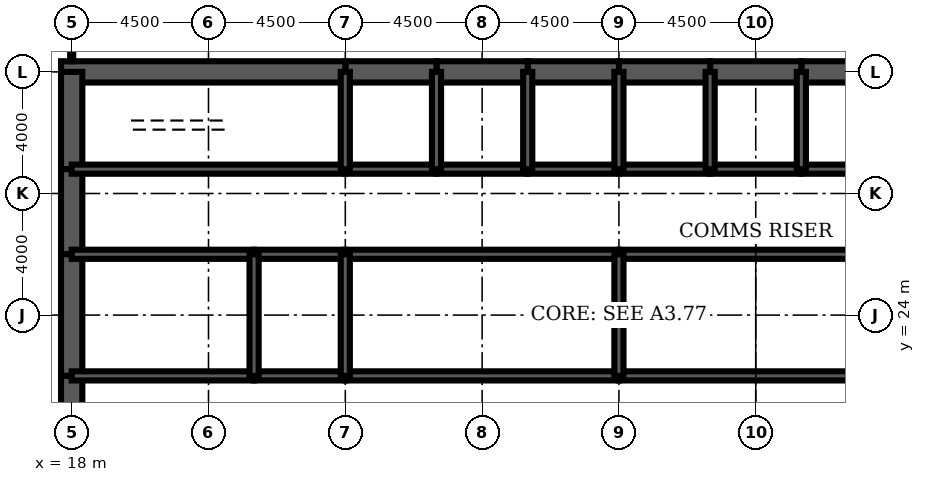
"""IFC4 building model, lengths in metres.
Left out: names, types, materials, properties, quantities, classifications, styles, units other than length and angle.
Written with IfcOpenShell. Run it as: python <this file> out.ifc"""

import sys

from ifc_helpers import new_model, si_unit, direction, frame, frame_2d, origin, place, context, subcontext, project, spatial, rectangle, extrude, element, fill, save


model = new_model("IFC4")
c1 = context("Model", 3, precision=1e-05, world=origin(), true_north=direction((0.0, 1.0)))
c2 = subcontext(c1, "Body", "Model", "MODEL_VIEW")
j1 = project(units=[si_unit("LENGTHUNIT", "METRE"), si_unit("PLANEANGLEUNIT", "RADIAN")], contexts=[c1])
p1 = place(None, origin())
s1 = spatial("IfcSite", under=j1, at=p1, CompositionType="ELEMENT")
p2 = place(p1, origin())
s2 = spatial("IfcBuilding", under=s1, at=p2, CompositionType="ELEMENT")
p3 = place(p2, frame((0.0, 0.0, 329.9)))
s3 = spatial("IfcBuildingStorey", under=s2, at=p3, CompositionType="ELEMENT", Elevation=329.9)
for number, where, z_axis, x_axis in (
    (1, (45.0, 32.0, 0.0), (0.0, 0.0, 1.0), (-1.0, 0.0, 0.0)),
    (2, (42.0, 32.0, 0.0), (0.0, 0.0, 1.0), (-1.0, 0.0, 0.0)),
    (3, (39.0, 32.0, 0.0), (0.0, 0.0, 1.0), (-1.0, 0.0, 0.0)),
    (4, (36.0, 32.0, 0.0), (0.0, 0.0, 1.0), (-1.0, 0.0, 0.0)),
    (5, (33.0, 32.0, 0.0), (0.0, 0.0, 1.0), (-1.0, 0.0, 0.0)),
    (6, (30.0, 32.0, 0.0), (0.0, 0.0, 1.0), (-1.0, 0.0, 0.0)),
):
    element("IfcWall", number, at=place(p3, frame(where, z_axis=z_axis, x_axis=x_axis)), inside=s3, PredefinedType="SHEAR", context=c2, shape_type="SweptSolid", body=[
        extrude(rectangle(XDim=3.0, YDim=0.7, at=frame_2d((1.5, 0.0))), origin(), (0.0, 0.0, 1.0), 4.2),
    ])
p4 = place(p3, frame((27.0, 32.0, 0.0), z_axis=(0.0, 0.0, 1.0), x_axis=(-1.0, 0.0, 0.0)))
e7 = element("IfcWall", 7, at=p4, inside=s3, PredefinedType="SHEAR", context=c2, shape_type="SweptSolid", body=[
    extrude(rectangle(XDim=9.35, YDim=0.7, at=frame_2d((4.675, 0.0))), origin(), (0.0, 0.0, 1.0), 4.2),
])
p5 = place(p3, frame((18.0, 32.0, 0.0), z_axis=(0.0, 0.0, 1.0), x_axis=(0.0, -1.0, 0.0)))
e8 = element("IfcWall", 8, at=p5, inside=s3, PredefinedType="SHEAR", context=c2, shape_type="SweptSolid", body=[
    extrude(rectangle(XDim=3.2, YDim=0.7, at=frame_2d((1.6, 0.0))), origin(), (0.0, 0.0, 1.0), 4.2),
])
p6 = place(p3, frame((18.0, 28.8, 0.0), z_axis=(0.0, 0.0, 1.0), x_axis=(0.0, -1.0, 0.0)))
e9 = element("IfcWall", 9, at=p6, inside=s3, PredefinedType="SHEAR", context=c2, shape_type="SweptSolid", body=[
    extrude(rectangle(XDim=2.8, YDim=0.7, at=frame_2d((1.4, 0.0))), origin(), (0.0, 0.0, 1.0), 4.2),
])
p7 = place(p6, frame((0.4, 0.0, 0.0)))
e10 = element("IfcOpeningElement", 10, at=p7, cuts=e9, PredefinedType="OPENING", context=c2, shape_type="SweptSolid", body=[
    extrude(rectangle(XDim=1.8, YDim=2.1, at=frame_2d((0.9, 1.05))), frame((0.0, 0.36, 0.0), z_axis=(0.0, -1.0, 0.0), x_axis=(1.0, 0.0, 0.0)), (0.0, 0.0, 1.0), 0.72),
])
p8 = place(p3, frame((18.0, 26.0, 0.0), z_axis=(0.0, 0.0, 1.0), x_axis=(0.0, -1.0, 0.0)))
e11 = element("IfcWall", 11, at=p8, inside=s3, PredefinedType="SHEAR", context=c2, shape_type="SweptSolid", body=[
    extrude(rectangle(XDim=4.0, YDim=0.7, at=frame_2d((2.0, 0.0))), origin(), (0.0, 0.0, 1.0), 4.2),
])
p9 = place(p3, frame((18.0, 22.0, 0.0), z_axis=(0.0, 0.0, 1.0), x_axis=(0.0, -1.0, 0.0)))
e12 = element("IfcWall", 12, at=p9, inside=s3, PredefinedType="SHEAR", context=c2, shape_type="SweptSolid", body=[
    extrude(rectangle(XDim=2.8, YDim=0.7, at=frame_2d((1.4, 0.0))), origin(), (0.0, 0.0, 1.0), 4.2),
])
p10 = place(p9, frame((0.6, 0.0, 0.0)))
e13 = element("IfcOpeningElement", 13, at=p10, cuts=e12, PredefinedType="OPENING", context=c2, shape_type="SweptSolid", body=[
    extrude(rectangle(XDim=1.8, YDim=2.1, at=frame_2d((0.9, 1.05))), frame((0.0, 0.36, 0.0), z_axis=(0.0, -1.0, 0.0), x_axis=(1.0, 0.0, 0.0)), (0.0, 0.0, 1.0), 0.72),
])
p11 = place(p3, frame((18.0, 28.8, 0.0), z_axis=(0.0, 0.0, 1.0), x_axis=(1.0, 0.0, 0.0)))
e14 = element("IfcWall", 14, at=p11, inside=s3, PredefinedType="SOLIDWALL", context=c2, shape_type="SweptSolid", body=[
    extrude(rectangle(XDim=9.0, YDim=0.3, at=frame_2d((4.5, 0.0))), origin(), (0.0, 0.0, 1.0), 4.2),
])
p12 = place(p11, frame((0.65, 0.0, 0.0)))
e15 = element("IfcOpeningElement", 15, at=p12, cuts=e14, PredefinedType="OPENING", context=c2, shape_type="SweptSolid", body=[
    extrude(rectangle(XDim=1.0, YDim=2.1, at=frame_2d((0.5, 1.05))), frame((0.0, 0.16, 0.0), z_axis=(0.0, -1.0, 0.0), x_axis=(1.0, 0.0, 0.0)), (0.0, 0.0, 1.0), 0.32),
])
p13 = place(p3, frame((27.0, 28.8, 0.0), z_axis=(0.0, 0.0, 1.0), x_axis=(1.0, 0.0, 0.0)))
e16 = element("IfcWall", 16, at=p13, inside=s3, PredefinedType="SOLIDWALL", context=c2, shape_type="SweptSolid", body=[
    extrude(rectangle(XDim=3.0, YDim=0.3, at=frame_2d((1.5, 0.0))), origin(), (0.0, 0.0, 1.0), 4.2),
])
p14 = place(p13, frame((0.95, 0.0, 0.0)))
e17 = element("IfcOpeningElement", 17, at=p14, cuts=e16, PredefinedType="OPENING", context=c2, shape_type="SweptSolid", body=[
    extrude(rectangle(XDim=1.1, YDim=2.2, at=frame_2d((0.55, 1.1))), frame((0.0, 0.16, 0.0), z_axis=(0.0, -1.0, 0.0), x_axis=(1.0, 0.0, 0.0)), (0.0, 0.0, 1.0), 0.32),
])
p15 = place(p3, frame((30.0, 28.8, 0.0), z_axis=(0.0, 0.0, 1.0), x_axis=(1.0, 0.0, 0.0)))
e18 = element("IfcWall", 18, at=p15, inside=s3, PredefinedType="SOLIDWALL", context=c2, shape_type="SweptSolid", body=[
    extrude(rectangle(XDim=3.0, YDim=0.3, at=frame_2d((1.5, 0.0))), origin(), (0.0, 0.0, 1.0), 4.2),
])
p16 = place(p15, frame((0.95, 0.0, 0.0)))
e19 = element("IfcOpeningElement", 19, at=p16, cuts=e18, PredefinedType="OPENING", context=c2, shape_type="SweptSolid", body=[
    extrude(rectangle(XDim=1.1, YDim=2.2, at=frame_2d((0.55, 1.1))), frame((0.0, 0.16, 0.0), z_axis=(0.0, -1.0, 0.0), x_axis=(1.0, 0.0, 0.0)), (0.0, 0.0, 1.0), 0.32),
])
p17 = place(p3, frame((33.0, 28.8, 0.0), z_axis=(0.0, 0.0, 1.0), x_axis=(1.0, 0.0, 0.0)))
e20 = element("IfcWall", 20, at=p17, inside=s3, PredefinedType="SOLIDWALL", context=c2, shape_type="SweptSolid", body=[
    extrude(rectangle(XDim=3.0, YDim=0.3, at=frame_2d((1.5, 0.0))), origin(), (0.0, 0.0, 1.0), 4.2),
])
p18 = place(p17, frame((0.95, 0.0, 0.0)))
e21 = element("IfcOpeningElement", 21, at=p18, cuts=e20, PredefinedType="OPENING", context=c2, shape_type="SweptSolid", body=[
    extrude(rectangle(XDim=1.1, YDim=2.2, at=frame_2d((0.55, 1.1))), frame((0.0, 0.16, 0.0), z_axis=(0.0, -1.0, 0.0), x_axis=(1.0, 0.0, 0.0)), (0.0, 0.0, 1.0), 0.32),
])
p19 = place(p3, frame((36.0, 28.8, 0.0), z_axis=(0.0, 0.0, 1.0), x_axis=(1.0, 0.0, 0.0)))
e22 = element("IfcWall", 22, at=p19, inside=s3, PredefinedType="SOLIDWALL", context=c2, shape_type="SweptSolid", body=[
    extrude(rectangle(XDim=3.0, YDim=0.3, at=frame_2d((1.5, 0.0))), origin(), (0.0, 0.0, 1.0), 4.2),
])
p20 = place(p19, frame((1.0, 0.0, 0.0)))
e23 = element("IfcOpeningElement", 23, at=p20, cuts=e22, PredefinedType="OPENING", context=c2, shape_type="SweptSolid", body=[
    extrude(rectangle(XDim=1.0, YDim=2.1, at=frame_2d((0.5, 1.05))), frame((0.0, 0.16, 0.0), z_axis=(0.0, -1.0, 0.0), x_axis=(1.0, 0.0, 0.0)), (0.0, 0.0, 1.0), 0.32),
])
p21 = place(p3, frame((39.0, 28.8, 0.0), z_axis=(0.0, 0.0, 1.0), x_axis=(1.0, 0.0, 0.0)))
e24 = element("IfcWall", 24, at=p21, inside=s3, PredefinedType="SOLIDWALL", context=c2, shape_type="SweptSolid", body=[
    extrude(rectangle(XDim=3.0, YDim=0.3, at=frame_2d((1.5, 0.0))), origin(), (0.0, 0.0, 1.0), 4.2),
])
p22 = place(p21, frame((1.0, 0.0, 0.0)))
e25 = element("IfcOpeningElement", 25, at=p22, cuts=e24, PredefinedType="OPENING", context=c2, shape_type="SweptSolid", body=[
    extrude(rectangle(XDim=1.0, YDim=2.1, at=frame_2d((0.5, 1.05))), frame((0.0, 0.16, 0.0), z_axis=(0.0, -1.0, 0.0), x_axis=(1.0, 0.0, 0.0)), (0.0, 0.0, 1.0), 0.32),
])
p23 = place(p3, frame((42.0, 28.8, 0.0), z_axis=(0.0, 0.0, 1.0), x_axis=(1.0, 0.0, 0.0)))
e26 = element("IfcWall", 26, at=p23, inside=s3, PredefinedType="SOLIDWALL", context=c2, shape_type="SweptSolid", body=[
    extrude(rectangle(XDim=3.0, YDim=0.3, at=frame_2d((1.5, 0.0))), origin(), (0.0, 0.0, 1.0), 4.2),
])
p24 = place(p23, frame((0.95, 0.0, 0.0)))
e27 = element("IfcOpeningElement", 27, at=p24, cuts=e26, PredefinedType="OPENING", context=c2, shape_type="SweptSolid", body=[
    extrude(rectangle(XDim=1.1, YDim=2.2, at=frame_2d((0.55, 1.1))), frame((0.0, 0.16, 0.0), z_axis=(0.0, -1.0, 0.0), x_axis=(1.0, 0.0, 0.0)), (0.0, 0.0, 1.0), 0.32),
])
p25 = place(p3, frame((18.0, 22.0, 0.0), z_axis=(0.0, 0.0, 1.0), x_axis=(1.0, 0.0, 0.0)))
e28 = element("IfcWall", 28, at=p25, inside=s3, PredefinedType="SOLIDWALL", context=c2, shape_type="SweptSolid", body=[
    extrude(rectangle(XDim=6.0, YDim=0.3, at=frame_2d((3.0, 0.0))), origin(), (0.0, 0.0, 1.0), 4.2),
])
p26 = place(p25, frame((4.4, 0.0, 0.0)))
e29 = element("IfcOpeningElement", 29, at=p26, cuts=e28, PredefinedType="OPENING", context=c2, shape_type="SweptSolid", body=[
    extrude(rectangle(XDim=1.0, YDim=2.1, at=frame_2d((0.5, 1.05))), frame((0.0, 0.16, 0.0), z_axis=(0.0, -1.0, 0.0), x_axis=(1.0, 0.0, 0.0)), (0.0, 0.0, 1.0), 0.32),
])
p27 = place(p25, frame((0.9, 0.0, 0.0)))
e30 = element("IfcOpeningElement", 30, at=p27, cuts=e28, PredefinedType="OPENING", context=c2, shape_type="SweptSolid", body=[
    extrude(rectangle(XDim=1.0, YDim=2.1, at=frame_2d((0.5, 1.05))), frame((0.0, 0.16, 0.0), z_axis=(0.0, -1.0, 0.0), x_axis=(1.0, 0.0, 0.0)), (0.0, 0.0, 1.0), 0.32),
])
p28 = place(p3, frame((24.0, 22.0, 0.0), z_axis=(0.0, 0.0, 1.0), x_axis=(1.0, 0.0, 0.0)))
e31 = element("IfcWall", 31, at=p28, inside=s3, PredefinedType="SOLIDWALL", context=c2, shape_type="SweptSolid", body=[
    extrude(rectangle(XDim=3.0, YDim=0.3, at=frame_2d((1.5, 0.0))), origin(), (0.0, 0.0, 1.0), 4.2),
])
p29 = place(p28, frame((1.0, 0.0, 0.0)))
e32 = element("IfcOpeningElement", 32, at=p29, cuts=e31, PredefinedType="OPENING", context=c2, shape_type="SweptSolid", body=[
    extrude(rectangle(XDim=1.0, YDim=2.1, at=frame_2d((0.5, 1.05))), frame((0.0, 0.16, 0.0), z_axis=(0.0, -1.0, 0.0), x_axis=(1.0, 0.0, 0.0)), (0.0, 0.0, 1.0), 0.32),
])
p30 = place(p3, frame((27.0, 22.0, 0.0), z_axis=(0.0, 0.0, 1.0), x_axis=(1.0, 0.0, 0.0)))
e33 = element("IfcWall", 33, at=p30, inside=s3, PredefinedType="SOLIDWALL", context=c2, shape_type="SweptSolid", body=[
    extrude(rectangle(XDim=9.0, YDim=0.3, at=frame_2d((4.5, 0.0))), origin(), (0.0, 0.0, 1.0), 4.2),
])
p31 = place(p30, frame((4.0, 0.0, 0.0)))
e34 = element("IfcOpeningElement", 34, at=p31, cuts=e33, PredefinedType="OPENING", context=c2, shape_type="SweptSolid", body=[
    extrude(rectangle(XDim=1.0, YDim=2.1, at=frame_2d((0.5, 1.05))), frame((0.0, 0.16, 0.0), z_axis=(0.0, -1.0, 0.0), x_axis=(1.0, 0.0, 0.0)), (0.0, 0.0, 1.0), 0.32),
])
p32 = place(p3, frame((36.0, 22.0, 0.0), z_axis=(0.0, 0.0, 1.0), x_axis=(1.0, 0.0, 0.0)))
e35 = element("IfcWall", 35, at=p32, inside=s3, PredefinedType="SOLIDWALL", context=c2, shape_type="SweptSolid", body=[
    extrude(rectangle(XDim=9.0, YDim=0.3, at=frame_2d((4.5, 0.0))), origin(), (0.0, 0.0, 1.0), 4.2),
])
p33 = place(p32, frame((4.0, 0.0, 0.0)))
e36 = element("IfcOpeningElement", 36, at=p33, cuts=e35, PredefinedType="OPENING", context=c2, shape_type="SweptSolid", body=[
    extrude(rectangle(XDim=1.0, YDim=2.1, at=frame_2d((0.5, 1.05))), frame((0.0, 0.16, 0.0), z_axis=(0.0, -1.0, 0.0), x_axis=(1.0, 0.0, 0.0)), (0.0, 0.0, 1.0), 0.32),
])
p34 = place(p3, frame((18.0, 26.0, 0.0), z_axis=(0.0, 0.0, 1.0), x_axis=(1.0, 0.0, 0.0)))
e37 = element("IfcWall", 37, at=p34, inside=s3, PredefinedType="SOLIDWALL", context=c2, shape_type="SweptSolid", body=[
    extrude(rectangle(XDim=6.0, YDim=0.3, at=frame_2d((3.0, 0.0))), origin(), (0.0, 0.0, 1.0), 4.2),
])
p35 = place(p3, frame((24.0, 26.0, 0.0), z_axis=(0.0, 0.0, 1.0), x_axis=(1.0, 0.0, 0.0)))
e38 = element("IfcWall", 38, at=p35, inside=s3, PredefinedType="SOLIDWALL", context=c2, shape_type="SweptSolid", body=[
    extrude(rectangle(XDim=3.0, YDim=0.3, at=frame_2d((1.5, 0.0))), origin(), (0.0, 0.0, 1.0), 4.2),
])
for number, where, z_axis, x_axis in (
    (39, (27.0, 26.0, 0.0), (0.0, 0.0, 1.0), (1.0, 0.0, 0.0)),
    (40, (36.0, 26.0, 0.0), (0.0, 0.0, 1.0), (1.0, 0.0, 0.0)),
):
    element("IfcWall", number, at=place(p3, frame(where, z_axis=z_axis, x_axis=x_axis)), inside=s3, PredefinedType="SOLIDWALL", context=c2, shape_type="SweptSolid", body=[
        extrude(rectangle(XDim=9.0, YDim=0.3, at=frame_2d((4.5, 0.0))), origin(), (0.0, 0.0, 1.0), 4.2),
    ])
for number, where, z_axis, x_axis in (
    (41, (27.0, 28.8, 0.0), (0.0, 0.0, 1.0), (0.0, 1.0, 0.0)),
    (42, (30.0, 28.8, 0.0), (0.0, 0.0, 1.0), (0.0, 1.0, 0.0)),
    (43, (33.0, 28.8, 0.0), (0.0, 0.0, 1.0), (0.0, 1.0, 0.0)),
    (44, (36.0, 28.8, 0.0), (0.0, 0.0, 1.0), (0.0, 1.0, 0.0)),
    (45, (39.0, 28.8, 0.0), (0.0, 0.0, 1.0), (0.0, 1.0, 0.0)),
    (46, (42.0, 28.8, 0.0), (0.0, 0.0, 1.0), (0.0, 1.0, 0.0)),
):
    element("IfcWall", number, at=place(p3, frame(where, z_axis=z_axis, x_axis=x_axis)), inside=s3, PredefinedType="SOLIDWALL", context=c2, shape_type="SweptSolid", body=[
        extrude(rectangle(XDim=3.2, YDim=0.3, at=frame_2d((1.6, 0.0))), origin(), (0.0, 0.0, 1.0), 4.2),
    ])
for number, where, z_axis, x_axis in (
    (47, (24.0, 22.0, 0.0), (0.0, 0.0, 1.0), (0.0, 1.0, 0.0)),
    (48, (27.0, 22.0, 0.0), (0.0, 0.0, 1.0), (0.0, 1.0, 0.0)),
    (49, (36.0, 22.0, 0.0), (0.0, 0.0, 1.0), (0.0, 1.0, 0.0)),
):
    element("IfcWall", number, at=place(p3, frame(where, z_axis=z_axis, x_axis=x_axis)), inside=s3, PredefinedType="SOLIDWALL", context=c2, shape_type="SweptSolid", body=[
        extrude(rectangle(XDim=4.0, YDim=0.3, at=frame_2d((2.0, 0.0))), origin(), (0.0, 0.0, 1.0), 4.2),
    ])
p36 = place(p3, frame((42.5, 22.15, 0.0), z_axis=(0.0, 0.0, 1.0), x_axis=(0.0, 1.0, 0.0)))
e50 = element("IfcWall", 50, at=p36, inside=s3, PredefinedType="PARTITIONING", context=c2, shape_type="SweptSolid", body=[
    extrude(rectangle(XDim=3.7, YDim=0.15, at=frame_2d((1.85, 0.0))), origin(), (0.0, 0.0, 1.0), 3.0),
])
p37 = place(p36, frame((2.2, 0.0, 0.0)))
e51 = element("IfcOpeningElement", 51, at=p37, cuts=e50, PredefinedType="OPENING", context=c2, shape_type="SweptSolid", body=[
    extrude(rectangle(XDim=1.0, YDim=2.1, at=frame_2d((0.5, 1.05))), frame((0.0, 0.085, 0.0), z_axis=(0.0, -1.0, 0.0), x_axis=(1.0, 0.0, 0.0)), (0.0, 0.0, 1.0), 0.17),
])
p38 = place(p3, frame((20.525, 22.15, 0.0), z_axis=(0.0, 0.0, 1.0), x_axis=(0.0, 1.0, 0.0)))
e52 = element("IfcWall", 52, at=p38, inside=s3, PredefinedType="PARTITIONING", context=c2, shape_type="SweptSolid", body=[
    extrude(rectangle(XDim=3.7, YDim=0.15, at=frame_2d((1.85, 0.0))), origin(), (0.0, 0.0, 1.0), 3.0),
])
p39 = place(p3, frame((22.2, 26.15, 0.0), z_axis=(0.0, 0.0, 1.0), x_axis=(0.0, 1.0, 0.0)))
e53 = element("IfcWall", 53, at=p39, inside=s3, PredefinedType="PARTITIONING", context=c2, shape_type="SweptSolid", body=[
    extrude(rectangle(XDim=2.5, YDim=0.15, at=frame_2d((1.25, 0.0))), origin(), (0.0, 0.0, 1.0), 3.0),
])
p40 = place(p39, frame((0.35, 0.0, 0.0)))
e54 = element("IfcOpeningElement", 54, at=p40, cuts=e53, PredefinedType="OPENING", context=c2, shape_type="SweptSolid", body=[
    extrude(rectangle(XDim=1.0, YDim=2.1, at=frame_2d((0.5, 1.05))), frame((0.0, 0.085, 0.0), z_axis=(0.0, -1.0, 0.0), x_axis=(1.0, 0.0, 0.0)), (0.0, 0.0, 1.0), 0.17),
])
p41 = place(p3, frame((18.0, 32.35, 0.0), z_axis=(0.0, 0.0, 1.0), x_axis=(0.0, 1.0, 0.0)))
e55 = element("IfcWall", 55, at=p41, inside=s3, PredefinedType="PARTITIONING", context=c2, shape_type="SweptSolid", body=[
    extrude(rectangle(XDim=3.2, YDim=0.1, at=frame_2d((1.6, 0.0))), origin(), (0.0, 0.0, 1.0), 3.0),
])
p42 = place(p41, frame((1.1, 0.0, 0.0)))
e56 = element("IfcOpeningElement", 56, at=p42, cuts=e55, PredefinedType="OPENING", context=c2, shape_type="SweptSolid", body=[
    extrude(rectangle(XDim=1.0, YDim=2.1, at=frame_2d((0.5, 1.05))), frame((0.0, 0.06, 0.0), z_axis=(0.0, -1.0, 0.0), x_axis=(1.0, 0.0, 0.0)), (0.0, 0.0, 1.0), 0.12),
])
p43 = place(p37, origin())
e57 = element("IfcDoor", 57, at=p43, inside=s3, OperationType="SINGLE_SWING_RIGHT", PredefinedType="DOOR", context=c2, shape_type="SweptSolid", body=[
    extrude(rectangle(XDim=1.0, YDim=2.1, at=frame_2d((0.5, 1.05))), frame((0.0, 0.025, 0.0), z_axis=(0.0, -1.0, 0.0), x_axis=(1.0, 0.0, 0.0)), (0.0, 0.0, 1.0), 0.05),
])
fill(e51, e57)
p44 = place(p40, origin())
e58 = element("IfcDoor", 58, at=p44, inside=s3, OperationType="SINGLE_SWING_LEFT", PredefinedType="DOOR", context=c2, shape_type="SweptSolid", body=[
    extrude(rectangle(XDim=1.0, YDim=2.1, at=frame_2d((0.5, 1.05))), frame((0.0, 0.025, 0.0), z_axis=(0.0, -1.0, 0.0), x_axis=(1.0, 0.0, 0.0)), (0.0, 0.0, 1.0), 0.05),
])
fill(e54, e58)
p45 = place(p24, origin())
e59 = element("IfcDoor", 59, at=p45, inside=s3, OperationType="DOUBLE_DOOR_SLIDING", PredefinedType="USERDEFINED", context=c2, shape_type="SweptSolid", body=[
    extrude(rectangle(XDim=1.1, YDim=2.2, at=frame_2d((0.55, 1.1))), frame((0.0, 0.025, 0.0), z_axis=(0.0, -1.0, 0.0), x_axis=(1.0, 0.0, 0.0)), (0.0, 0.0, 1.0), 0.05),
])
fill(e27, e59)
p46 = place(p14, origin())
e60 = element("IfcDoor", 60, at=p46, inside=s3, OperationType="DOUBLE_DOOR_SLIDING", PredefinedType="USERDEFINED", context=c2, shape_type="SweptSolid", body=[
    extrude(rectangle(XDim=1.1, YDim=2.2, at=frame_2d((0.55, 1.1))), frame((0.0, 0.025, 0.0), z_axis=(0.0, -1.0, 0.0), x_axis=(1.0, 0.0, 0.0)), (0.0, 0.0, 1.0), 0.05),
])
fill(e17, e60)
p47 = place(p16, origin())
e61 = element("IfcDoor", 61, at=p47, inside=s3, OperationType="DOUBLE_DOOR_SLIDING", PredefinedType="USERDEFINED", context=c2, shape_type="SweptSolid", body=[
    extrude(rectangle(XDim=1.1, YDim=2.2, at=frame_2d((0.55, 1.1))), frame((0.0, 0.025, 0.0), z_axis=(0.0, -1.0, 0.0), x_axis=(1.0, 0.0, 0.0)), (0.0, 0.0, 1.0), 0.05),
])
fill(e19, e61)
p48 = place(p18, origin())
e62 = element("IfcDoor", 62, at=p48, inside=s3, OperationType="DOUBLE_DOOR_SLIDING", PredefinedType="USERDEFINED", context=c2, shape_type="SweptSolid", body=[
    extrude(rectangle(XDim=1.1, YDim=2.2, at=frame_2d((0.55, 1.1))), frame((0.0, 0.025, 0.0), z_axis=(0.0, -1.0, 0.0), x_axis=(1.0, 0.0, 0.0)), (0.0, 0.0, 1.0), 0.05),
])
fill(e21, e62)
p49 = place(p12, origin())
e63 = element("IfcDoor", 63, at=p49, inside=s3, OperationType="SINGLE_SWING_LEFT", PredefinedType="DOOR", context=c2, shape_type="SweptSolid", body=[
    extrude(rectangle(XDim=1.0, YDim=2.1, at=frame_2d((0.5, 1.05))), frame((0.0, 0.025, 0.0), z_axis=(0.0, -1.0, 0.0), x_axis=(1.0, 0.0, 0.0)), (0.0, 0.0, 1.0), 0.05),
])
fill(e15, e63)
p50 = place(p10, origin())
e64 = element("IfcDoor", 64, at=p50, inside=s3, OperationType="SINGLE_SWING_LEFT", PredefinedType="DOOR", context=c2, shape_type="SweptSolid", body=[
    extrude(rectangle(XDim=1.8, YDim=2.1, at=frame_2d((0.9, 1.05))), frame((0.0, 0.35, 0.0), z_axis=(0.0, -1.0, 0.0), x_axis=(1.0, 0.0, 0.0)), (0.0, 0.0, 1.0), 0.699),
])
fill(e13, e64)
p51 = place(p7, origin())
e65 = element("IfcDoor", 65, at=p51, inside=s3, OperationType="SINGLE_SWING_LEFT", PredefinedType="DOOR", context=c2, shape_type="SweptSolid", body=[
    extrude(rectangle(XDim=1.8, YDim=2.1, at=frame_2d((0.9, 1.05))), frame((0.0, 0.35, 0.0), z_axis=(0.0, -1.0, 0.0), x_axis=(1.0, 0.0, 0.0)), (0.0, 0.0, 1.0), 0.699),
])
fill(e10, e65)
p52 = place(p26, origin())
e66 = element("IfcDoor", 66, at=p52, inside=s3, OperationType="SINGLE_SWING_RIGHT", PredefinedType="DOOR", context=c2, shape_type="SweptSolid", body=[
    extrude(rectangle(XDim=1.0, YDim=2.1, at=frame_2d((0.5, 1.05))), frame((0.0, 0.025, 0.0), z_axis=(0.0, -1.0, 0.0), x_axis=(1.0, 0.0, 0.0)), (0.0, 0.0, 1.0), 0.05),
])
fill(e29, e66)
p53 = place(p29, origin())
e67 = element("IfcDoor", 67, at=p53, inside=s3, OperationType="SINGLE_SWING_LEFT", PredefinedType="DOOR", context=c2, shape_type="SweptSolid", body=[
    extrude(rectangle(XDim=1.0, YDim=2.1, at=frame_2d((0.5, 1.05))), frame((0.0, 0.025, 0.0), z_axis=(0.0, -1.0, 0.0), x_axis=(1.0, 0.0, 0.0)), (0.0, 0.0, 1.0), 0.05),
])
fill(e32, e67)
p54 = place(p31, origin())
e68 = element("IfcDoor", 68, at=p54, inside=s3, OperationType="SINGLE_SWING_LEFT", PredefinedType="DOOR", context=c2, shape_type="SweptSolid", body=[
    extrude(rectangle(XDim=1.0, YDim=2.1, at=frame_2d((0.5, 1.05))), frame((0.0, 0.025, 0.0), z_axis=(0.0, -1.0, 0.0), x_axis=(1.0, 0.0, 0.0)), (0.0, 0.0, 1.0), 0.05),
])
fill(e34, e68)
p55 = place(p33, origin())
e69 = element("IfcDoor", 69, at=p55, inside=s3, OperationType="SINGLE_SWING_LEFT", PredefinedType="DOOR", context=c2, shape_type="SweptSolid", body=[
    extrude(rectangle(XDim=1.0, YDim=2.1, at=frame_2d((0.5, 1.05))), frame((0.0, 0.025, 0.0), z_axis=(0.0, -1.0, 0.0), x_axis=(1.0, 0.0, 0.0)), (0.0, 0.0, 1.0), 0.05),
])
fill(e36, e69)
p56 = place(p27, origin())
e70 = element("IfcDoor", 70, at=p56, inside=s3, OperationType="SINGLE_SWING_LEFT", PredefinedType="DOOR", context=c2, shape_type="SweptSolid", body=[
    extrude(rectangle(XDim=1.0, YDim=2.1, at=frame_2d((0.5, 1.05))), frame((0.0, 0.025, 0.0), z_axis=(0.0, -1.0, 0.0), x_axis=(1.0, 0.0, 0.0)), (0.0, 0.0, 1.0), 0.05),
])
fill(e30, e70)
p57 = place(p20, origin())
e71 = element("IfcDoor", 71, at=p57, inside=s3, OperationType="SINGLE_SWING_LEFT", PredefinedType="DOOR", context=c2, shape_type="SweptSolid", body=[
    extrude(rectangle(XDim=1.0, YDim=2.1, at=frame_2d((0.5, 1.05))), frame((0.0, 0.025, 0.0), z_axis=(0.0, -1.0, 0.0), x_axis=(1.0, 0.0, 0.0)), (0.0, 0.0, 1.0), 0.05),
])
fill(e23, e71)
p58 = place(p22, origin())
e72 = element("IfcDoor", 72, at=p58, inside=s3, OperationType="SINGLE_SWING_LEFT", PredefinedType="DOOR", context=c2, shape_type="SweptSolid", body=[
    extrude(rectangle(XDim=1.0, YDim=2.1, at=frame_2d((0.5, 1.05))), frame((0.0, 0.025, 0.0), z_axis=(0.0, -1.0, 0.0), x_axis=(1.0, 0.0, 0.0)), (0.0, 0.0, 1.0), 0.05),
])
fill(e25, e72)
save(model, sys.argv[1])
